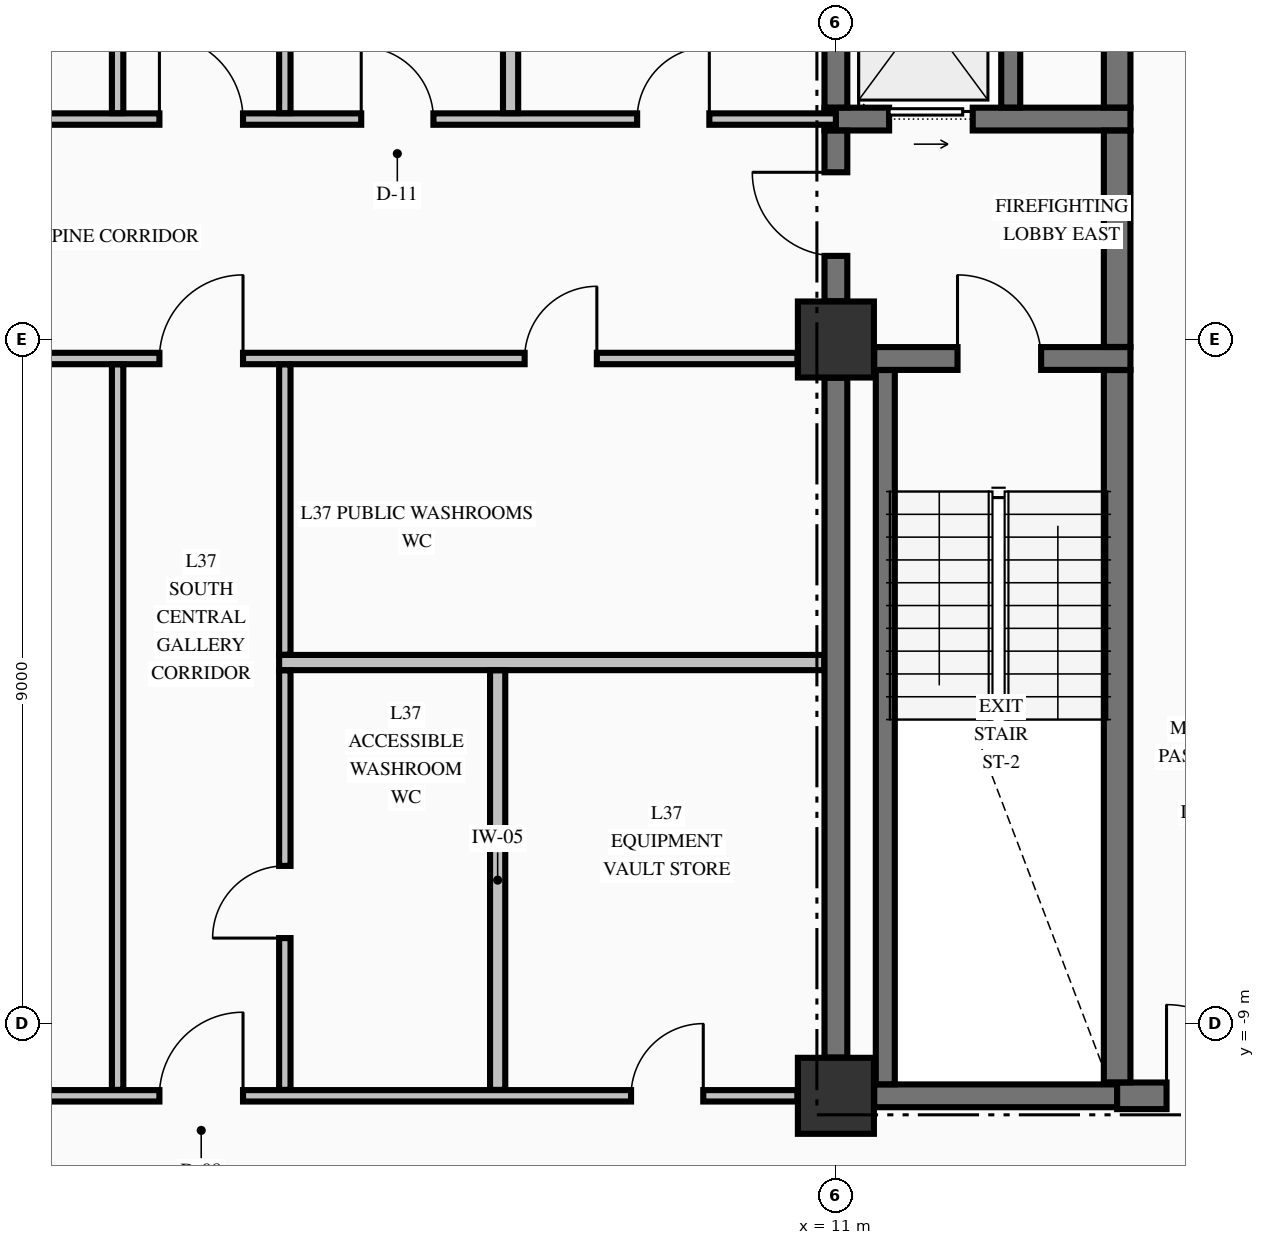
"""IFC4 building model, lengths in metres.
Left out: names, types, materials, properties, quantities, classifications, styles, units other than length and angle.
Written with IfcOpenShell. Run it as: python <this file> out.ifc"""

import sys

from ifc_helpers import new_model, si_unit, direction, frame, frame_2d, origin, origin_2d, place, context, subcontext, project, spatial, rectangle, extrude, element, fill, save


model = new_model("IFC4")
c1 = context("Model", 3, precision=1e-05, world=origin(), true_north=direction((0.0, 1.0)))
c2 = subcontext(c1, "Body", "Model", "MODEL_VIEW")
j1 = project(units=[si_unit("LENGTHUNIT", "METRE"), si_unit("PLANEANGLEUNIT", "RADIAN")], contexts=[c1])
p1 = place(None, origin())
s1 = spatial("IfcSite", under=j1, at=p1, CompositionType="ELEMENT")
p2 = place(p1, origin())
s2 = spatial("IfcBuilding", under=s1, at=p2, CompositionType="ELEMENT")
p3 = place(p2, frame((0.0, 0.0, 146.34)))
s3 = spatial("IfcBuildingStorey", under=s2, at=p3, CompositionType="ELEMENT", Elevation=146.34)
for number, where, z_axis, x_axis in (
    (1, (11.0, -9.95, -0.25), (0.0, 0.0, 1.0), (1.0, 0.0, 0.0)),
    (2, (11.0, 0.0, -0.25), (0.0, 0.0, 1.0), (1.0, 0.0, 0.0)),
):
    element("IfcColumn", number, at=place(p3, frame(where, z_axis=z_axis, x_axis=x_axis)), inside=s3, PredefinedType="COLUMN", context=c2, shape_type="SweptSolid", body=[
        extrude(rectangle(XDim=1.0, YDim=1.0, at=origin_2d()), origin(), (0.0, 0.0, 1.0), 3.57),
    ])
p4 = place(p3, frame((11.504, -9.95, 0.0), z_axis=(0.0, 0.0, 1.0), x_axis=(1.0, 0.0, 0.0)))
e3 = element("IfcWall", 3, at=p4, inside=s3, PredefinedType="SHEAR", context=c2, shape_type="SweptSolid", body=[
    extrude(rectangle(XDim=3.196, YDim=0.3, at=frame_2d((1.598, 0.0))), origin(), (0.0, 0.0, 1.0), 3.32),
])
p5 = place(p3, frame((14.7, -9.95, 0.0), z_axis=(0.0, 0.0, 1.0), x_axis=(1.0, 0.0, 0.0)))
e4 = element("IfcWall", 4, at=p5, inside=s3, PredefinedType="SHEAR", context=c2, shape_type="SweptSolid", body=[
    extrude(rectangle(XDim=4.796, YDim=0.35, at=frame_2d((2.398, 0.0))), origin(), (0.0, 0.0, 1.0), 3.32),
])
p6 = place(p5, frame((0.65, 0.0, 0.0)))
e5 = element("IfcOpeningElement", 5, at=p6, cuts=e4, PredefinedType="OPENING", context=c2, shape_type="SweptSolid", body=[
    extrude(rectangle(XDim=1.2, YDim=2.15, at=frame_2d((0.6, 1.075))), frame((0.0, 0.185, 0.0), z_axis=(0.0, -1.0, 0.0), x_axis=(1.0, 0.0, 0.0)), (0.0, 0.0, 1.0), 0.37),
])
p7 = place(p3, frame((11.504, -0.25, 0.0), z_axis=(0.0, 0.0, 1.0), x_axis=(1.0, 0.0, 0.0)))
e6 = element("IfcWall", 6, at=p7, inside=s3, PredefinedType="SHEAR", context=c2, shape_type="SweptSolid", body=[
    extrude(rectangle(XDim=3.371, YDim=0.3, at=frame_2d((1.686, 0.0))), origin(), (0.0, 0.0, 1.0), 3.32),
])
p8 = place(p7, frame((1.096, 0.0, 0.0)))
e7 = element("IfcOpeningElement", 7, at=p8, cuts=e6, PredefinedType="OPENING", context=c2, shape_type="SweptSolid", body=[
    extrude(rectangle(XDim=1.1, YDim=2.15, at=frame_2d((0.55, 1.075))), frame((0.0, 0.16, 0.0), z_axis=(0.0, -1.0, 0.0), x_axis=(1.0, 0.0, 0.0)), (0.0, 0.0, 1.0), 0.32),
])
p9 = place(p3, frame((10.85, 2.9, 0.0), z_axis=(0.0, 0.0, 1.0), x_axis=(1.0, 0.0, 0.0)))
e8 = element("IfcWall", 8, at=p9, inside=s3, PredefinedType="SHEAR", context=c2, shape_type="SweptSolid", body=[
    extrude(rectangle(XDim=4.025, YDim=0.3, at=frame_2d((2.012, 0.0))), origin(), (0.0, 0.0, 1.0), 3.32),
])
p10 = place(p9, frame((0.85, 0.0, 0.0)))
e9 = element("IfcOpeningElement", 9, at=p10, cuts=e8, PredefinedType="OPENING", context=c2, shape_type="SweptSolid", body=[
    extrude(rectangle(XDim=1.1, YDim=2.2, at=frame_2d((0.55, 1.1))), frame((0.0, 0.16, 0.0), z_axis=(0.0, -1.0, 0.0), x_axis=(1.0, 0.0, 0.0)), (0.0, 0.0, 1.0), 0.32),
])
p11 = place(p3, frame((-10.494, -9.95, 0.0), z_axis=(0.0, 0.0, 1.0), x_axis=(1.0, 0.0, 0.0)))
e10 = element("IfcWall", 10, at=p11, inside=s3, PredefinedType="PARTITIONING", context=c2, shape_type="SweptSolid", body=[
    extrude(rectangle(XDim=20.988, YDim=0.15, at=frame_2d((10.494, 0.0))), origin(), (0.0, 0.0, 1.0), 3.32),
])
p12 = place(p11, frame((12.594, 0.0, 0.0)))
e11 = element("IfcOpeningElement", 11, at=p12, cuts=e10, PredefinedType="OPENING", context=c2, shape_type="SweptSolid", body=[
    extrude(rectangle(XDim=1.1, YDim=2.15, at=frame_2d((0.55, 1.075))), frame((0.0, 0.085, 0.0), z_axis=(0.0, -1.0, 0.0), x_axis=(1.0, 0.0, 0.0)), (0.0, 0.0, 1.0), 0.17),
])
p13 = place(p11, frame((18.799, 0.0, 0.0)))
e12 = element("IfcOpeningElement", 12, at=p13, cuts=e10, PredefinedType="OPENING", context=c2, shape_type="SweptSolid", body=[
    extrude(rectangle(XDim=0.95, YDim=2.15, at=frame_2d((0.475, 1.075))), frame((0.0, 0.085, 0.0), z_axis=(0.0, -1.0, 0.0), x_axis=(1.0, 0.0, 0.0)), (0.0, 0.0, 1.0), 0.17),
])
p14 = place(p3, frame((3.675, -4.25, 0.0), z_axis=(0.0, 0.0, 1.0), x_axis=(1.0, 0.0, 0.0)))
e13 = element("IfcWall", 13, at=p14, inside=s3, PredefinedType="PARTITIONING", context=c2, shape_type="SweptSolid", body=[
    extrude(rectangle(XDim=7.172, YDim=0.2, at=frame_2d((3.586, 0.0))), origin(), (0.0, 0.0, 1.0), 3.32),
])
p15 = place(p3, frame((-10.494, -0.25, 0.0), z_axis=(0.0, 0.0, 1.0), x_axis=(1.0, 0.0, 0.0)))
e14 = element("IfcWall", 14, at=p15, inside=s3, PredefinedType="PARTITIONING", context=c2, shape_type="SweptSolid", body=[
    extrude(rectangle(XDim=20.988, YDim=0.15, at=frame_2d((10.494, 0.0))), origin(), (0.0, 0.0, 1.0), 3.32),
])
p16 = place(p15, frame((12.594, 0.0, 0.0)))
e15 = element("IfcOpeningElement", 15, at=p16, cuts=e14, PredefinedType="OPENING", context=c2, shape_type="SweptSolid", body=[
    extrude(rectangle(XDim=1.1, YDim=2.15, at=frame_2d((0.55, 1.075))), frame((0.0, 0.085, 0.0), z_axis=(0.0, -1.0, 0.0), x_axis=(1.0, 0.0, 0.0)), (0.0, 0.0, 1.0), 0.17),
])
p17 = place(p15, frame((5.249, 0.0, 0.0)))
e16 = element("IfcOpeningElement", 16, at=p17, cuts=e14, PredefinedType="OPENING", context=c2, shape_type="SweptSolid", body=[
    extrude(rectangle(XDim=1.05, YDim=2.15, at=frame_2d((0.525, 1.075))), frame((0.0, 0.085, 0.0), z_axis=(0.0, -1.0, 0.0), x_axis=(1.0, 0.0, 0.0)), (0.0, 0.0, 1.0), 0.17),
])
p18 = place(p15, frame((17.399, 0.0, 0.0)))
e17 = element("IfcOpeningElement", 17, at=p18, cuts=e14, PredefinedType="OPENING", context=c2, shape_type="SweptSolid", body=[
    extrude(rectangle(XDim=0.95, YDim=2.15, at=frame_2d((0.475, 1.075))), frame((0.0, 0.085, 0.0), z_axis=(0.0, -1.0, 0.0), x_axis=(1.0, 0.0, 0.0)), (0.0, 0.0, 1.0), 0.17),
])
p19 = place(p3, frame((-11.0, 2.9, 0.0), z_axis=(0.0, 0.0, 1.0), x_axis=(1.0, 0.0, 0.0)))
e18 = element("IfcWall", 18, at=p19, inside=s3, PredefinedType="PARTITIONING", context=c2, shape_type="SweptSolid", body=[
    extrude(rectangle(XDim=22.0, YDim=0.15, at=frame_2d((11.0, 0.0))), origin(), (0.0, 0.0, 1.0), 3.32),
])
p20 = place(p19, frame((13.1, 0.0, 0.0)))
e19 = element("IfcOpeningElement", 19, at=p20, cuts=e18, PredefinedType="OPENING", context=c2, shape_type="SweptSolid", body=[
    extrude(rectangle(XDim=1.1, YDim=2.15, at=frame_2d((0.55, 1.075))), frame((0.0, 0.085, 0.0), z_axis=(0.0, -1.0, 0.0), x_axis=(1.0, 0.0, 0.0)), (0.0, 0.0, 1.0), 0.17),
])
p21 = place(p19, frame((5.755, 0.0, 0.0)))
e20 = element("IfcOpeningElement", 20, at=p21, cuts=e18, PredefinedType="OPENING", context=c2, shape_type="SweptSolid", body=[
    extrude(rectangle(XDim=1.05, YDim=2.15, at=frame_2d((0.525, 1.075))), frame((0.0, 0.085, 0.0), z_axis=(0.0, -1.0, 0.0), x_axis=(1.0, 0.0, 0.0)), (0.0, 0.0, 1.0), 0.17),
])
p22 = place(p19, frame((15.755, 0.0, 0.0)))
e21 = element("IfcOpeningElement", 21, at=p22, cuts=e18, PredefinedType="OPENING", context=c2, shape_type="SweptSolid", body=[
    extrude(rectangle(XDim=0.95, YDim=2.15, at=frame_2d((0.475, 1.075))), frame((0.0, 0.085, 0.0), z_axis=(0.0, -1.0, 0.0), x_axis=(1.0, 0.0, 0.0)), (0.0, 0.0, 1.0), 0.17),
])
p23 = place(p19, frame((19.385, 0.0, 0.0)))
e22 = element("IfcOpeningElement", 22, at=p23, cuts=e18, PredefinedType="OPENING", context=c2, shape_type="SweptSolid", body=[
    extrude(rectangle(XDim=0.95, YDim=2.15, at=frame_2d((0.475, 1.075))), frame((0.0, 0.085, 0.0), z_axis=(0.0, -1.0, 0.0), x_axis=(1.0, 0.0, 0.0)), (0.0, 0.0, 1.0), 0.17),
])
p24 = place(p3, frame((11.0, -9.446, 0.0), z_axis=(0.0, 0.0, 1.0), x_axis=(0.0, 1.0, 0.0)))
e23 = element("IfcWall", 23, at=p24, inside=s3, PredefinedType="SHEAR", context=c2, shape_type="SweptSolid", body=[
    extrude(rectangle(XDim=8.942, YDim=0.3, at=frame_2d((4.471, 0.0))), origin(), (0.0, 0.0, 1.0), 3.32),
])
p25 = place(p3, frame((11.0, 0.504, 0.0), z_axis=(0.0, 0.0, 1.0), x_axis=(0.0, 1.0, 0.0)))
e24 = element("IfcWall", 24, at=p25, inside=s3, PredefinedType="SHEAR", context=c2, shape_type="SweptSolid", body=[
    extrude(rectangle(XDim=2.244, YDim=0.3, at=frame_2d((1.122, 0.0))), origin(), (0.0, 0.0, 1.0), 3.32),
])
p26 = place(p25, frame((0.596, 0.0, 0.0)))
e25 = element("IfcOpeningElement", 25, at=p26, cuts=e24, PredefinedType="OPENING", context=c2, shape_type="SweptSolid", body=[
    extrude(rectangle(XDim=1.1, YDim=2.15, at=frame_2d((0.55, 1.075))), frame((0.0, 0.16, 0.0), z_axis=(0.0, -1.0, 0.0), x_axis=(1.0, 0.0, 0.0)), (0.0, 0.0, 1.0), 0.32),
])
p27 = place(p3, frame((11.0, 3.052, 0.0), z_axis=(0.0, 0.0, 1.0), x_axis=(0.0, 1.0, 0.0)))
e26 = element("IfcWall", 26, at=p27, inside=s3, PredefinedType="SHEAR", context=c2, shape_type="SweptSolid", body=[
    extrude(rectangle(XDim=2.496, YDim=0.3, at=frame_2d((1.248, 0.0))), origin(), (0.0, 0.0, 1.0), 3.32),
])
p28 = place(p3, frame((11.65, -9.798, 0.0), z_axis=(0.0, 0.0, 1.0), x_axis=(0.0, 1.0, 0.0)))
e27 = element("IfcWall", 27, at=p28, inside=s3, PredefinedType="SOLIDWALL", context=c2, shape_type="SweptSolid", body=[
    extrude(rectangle(XDim=9.396, YDim=0.25, at=frame_2d((4.698, 0.0))), origin(), (0.0, 0.0, 1.0), 3.32),
])
p29 = place(p3, frame((13.3, 3.052, 0.0), z_axis=(0.0, 0.0, 1.0), x_axis=(0.0, 1.0, 0.0)))
e28 = element("IfcWall", 28, at=p29, inside=s3, PredefinedType="SOLIDWALL", context=c2, shape_type="SweptSolid", body=[
    extrude(rectangle(XDim=2.496, YDim=0.25, at=frame_2d((1.248, 0.0))), origin(), (0.0, 0.0, 1.0), 3.32),
])
p30 = place(p3, frame((14.7, -9.773, 0.0), z_axis=(0.0, 0.0, 1.0), x_axis=(0.0, 1.0, 0.0)))
e29 = element("IfcWall", 29, at=p30, inside=s3, PredefinedType="SHEAR", context=c2, shape_type="SweptSolid", body=[
    extrude(rectangle(XDim=9.371, YDim=0.35, at=frame_2d((4.686, 0.0))), origin(), (0.0, 0.0, 1.0), 3.32),
])
p31 = place(p3, frame((14.7, -0.098, 0.0), z_axis=(0.0, 0.0, 1.0), x_axis=(0.0, 1.0, 0.0)))
e30 = element("IfcWall", 30, at=p31, inside=s3, PredefinedType="SHEAR", context=c2, shape_type="SweptSolid", body=[
    extrude(rectangle(XDim=2.846, YDim=0.35, at=frame_2d((1.423, 0.0))), origin(), (0.0, 0.0, 1.0), 3.32),
])
p32 = place(p3, frame((14.7, 3.052, 0.0), z_axis=(0.0, 0.0, 1.0), x_axis=(0.0, 1.0, 0.0)))
e31 = element("IfcWall", 31, at=p32, inside=s3, PredefinedType="SHEAR", context=c2, shape_type="SweptSolid", body=[
    extrude(rectangle(XDim=2.496, YDim=0.35, at=frame_2d((1.248, 0.0))), origin(), (0.0, 0.0, 1.0), 3.32),
])
p33 = place(p3, frame((1.55, -9.872, 0.0), z_axis=(0.0, 0.0, 1.0), x_axis=(0.0, 1.0, 0.0)))
e32 = element("IfcWall", 32, at=p33, inside=s3, PredefinedType="PARTITIONING", context=c2, shape_type="SweptSolid", body=[
    extrude(rectangle(XDim=9.544, YDim=0.15, at=frame_2d((4.772, 0.0))), origin(), (0.0, 0.0, 1.0), 3.32),
])
p34 = place(p3, frame((1.55, 2.978, 0.0), z_axis=(0.0, 0.0, 1.0), x_axis=(0.0, 1.0, 0.0)))
e33 = element("IfcWall", 33, at=p34, inside=s3, PredefinedType="PARTITIONING", context=c2, shape_type="SweptSolid", body=[
    extrude(rectangle(XDim=7.444, YDim=0.15, at=frame_2d((3.722, 0.0))), origin(), (0.0, 0.0, 1.0), 3.32),
])
p35 = place(p3, frame((3.75, -9.872, 0.0), z_axis=(0.0, 0.0, 1.0), x_axis=(0.0, 1.0, 0.0)))
e34 = element("IfcWall", 34, at=p35, inside=s3, PredefinedType="PARTITIONING", context=c2, shape_type="SweptSolid", body=[
    extrude(rectangle(XDim=5.519, YDim=0.15, at=frame_2d((2.76, 0.0))), origin(), (0.0, 0.0, 1.0), 3.32),
])
p36 = place(p35, frame((1.997, 0.0, 0.0)))
e35 = element("IfcOpeningElement", 35, at=p36, cuts=e34, PredefinedType="OPENING", context=c2, shape_type="SweptSolid", body=[
    extrude(rectangle(XDim=0.95, YDim=2.15, at=frame_2d((0.475, 1.075))), frame((0.0, 0.085, 0.0), z_axis=(0.0, -1.0, 0.0), x_axis=(1.0, 0.0, 0.0)), (0.0, 0.0, 1.0), 0.17),
])
p37 = place(p3, frame((3.75, -4.147, 0.0), z_axis=(0.0, 0.0, 1.0), x_axis=(0.0, 1.0, 0.0)))
e36 = element("IfcWall", 36, at=p37, inside=s3, PredefinedType="PARTITIONING", context=c2, shape_type="SweptSolid", body=[
    extrude(rectangle(XDim=3.819, YDim=0.15, at=frame_2d((1.91, 0.0))), origin(), (0.0, 0.0, 1.0), 3.32),
])
p38 = place(p3, frame((3.75, 2.978, 0.0), z_axis=(0.0, 0.0, 1.0), x_axis=(0.0, 1.0, 0.0)))
e37 = element("IfcWall", 37, at=p38, inside=s3, PredefinedType="PARTITIONING", context=c2, shape_type="SweptSolid", body=[
    extrude(rectangle(XDim=7.444, YDim=0.15, at=frame_2d((3.722, 0.0))), origin(), (0.0, 0.0, 1.0), 3.32),
])
p39 = place(p3, frame((6.55, -9.872, 0.0), z_axis=(0.0, 0.0, 1.0), x_axis=(0.0, 1.0, 0.0)))
e38 = element("IfcWall", 38, at=p39, inside=s3, PredefinedType="PARTITIONING", context=c2, shape_type="SweptSolid", body=[
    extrude(rectangle(XDim=5.519, YDim=0.2, at=frame_2d((2.76, 0.0))), origin(), (0.0, 0.0, 1.0), 3.32),
])
p40 = place(p3, frame((6.72, 2.978, 0.0), z_axis=(0.0, 0.0, 1.0), x_axis=(0.0, 1.0, 0.0)))
e39 = element("IfcWall", 39, at=p40, inside=s3, PredefinedType="PARTITIONING", context=c2, shape_type="SweptSolid", body=[
    extrude(rectangle(XDim=7.444, YDim=0.2, at=frame_2d((3.722, 0.0))), origin(), (0.0, 0.0, 1.0), 3.32),
])
p41 = place(p8, origin())
e40 = element("IfcDoor", 40, at=p41, inside=s3, OperationType="SINGLE_SWING_LEFT", PredefinedType="DOOR", context=c2, shape_type="SweptSolid", body=[
    extrude(rectangle(XDim=1.1, YDim=2.15, at=frame_2d((0.55, 1.075))), frame((0.0, 0.025, 0.0), z_axis=(0.0, -1.0, 0.0), x_axis=(1.0, 0.0, 0.0)), (0.0, 0.0, 1.0), 0.05),
])
fill(e7, e40)
p42 = place(p26, origin())
e41 = element("IfcDoor", 41, at=p42, inside=s3, OperationType="SINGLE_SWING_RIGHT", PredefinedType="DOOR", context=c2, shape_type="SweptSolid", body=[
    extrude(rectangle(XDim=1.1, YDim=2.15, at=frame_2d((0.55, 1.075))), frame((0.0, 0.025, 0.0), z_axis=(0.0, -1.0, 0.0), x_axis=(1.0, 0.0, 0.0)), (0.0, 0.0, 1.0), 0.05),
])
fill(e25, e41)
p43 = place(p10, origin())
e42 = element("IfcDoor", 42, at=p43, inside=s3, OperationType="SLIDING_TO_RIGHT", PredefinedType="DOOR", context=c2, shape_type="SweptSolid", body=[
    extrude(rectangle(XDim=1.1, YDim=2.2, at=frame_2d((0.55, 1.1))), frame((0.0, 0.025, 0.0), z_axis=(0.0, -1.0, 0.0), x_axis=(1.0, 0.0, 0.0)), (0.0, 0.0, 1.0), 0.05),
])
fill(e9, e42)
p44 = place(p6, origin())
e43 = element("IfcDoor", 43, at=p44, inside=s3, OperationType="SINGLE_SWING_LEFT", PredefinedType="DOOR", context=c2, shape_type="SweptSolid", body=[
    extrude(rectangle(XDim=1.2, YDim=2.15, at=frame_2d((0.6, 1.075))), frame((0.0, 0.025, 0.0), z_axis=(0.0, -1.0, 0.0), x_axis=(1.0, 0.0, 0.0)), (0.0, 0.0, 1.0), 0.05),
])
fill(e5, e43)
p45 = place(p12, origin())
e44 = element("IfcDoor", 44, at=p45, inside=s3, OperationType="SINGLE_SWING_RIGHT", PredefinedType="DOOR", context=c2, shape_type="SweptSolid", body=[
    extrude(rectangle(XDim=1.1, YDim=2.15, at=frame_2d((0.55, 1.075))), frame((0.0, 0.025, 0.0), z_axis=(0.0, -1.0, 0.0), x_axis=(1.0, 0.0, 0.0)), (0.0, 0.0, 1.0), 0.05),
])
fill(e11, e44)
p46 = place(p20, origin())
e45 = element("IfcDoor", 45, at=p46, inside=s3, OperationType="SINGLE_SWING_LEFT", PredefinedType="DOOR", context=c2, shape_type="SweptSolid", body=[
    extrude(rectangle(XDim=1.1, YDim=2.15, at=frame_2d((0.55, 1.075))), frame((0.0, 0.025, 0.0), z_axis=(0.0, -1.0, 0.0), x_axis=(1.0, 0.0, 0.0)), (0.0, 0.0, 1.0), 0.05),
])
fill(e19, e45)
p47 = place(p16, origin())
e46 = element("IfcDoor", 46, at=p47, inside=s3, OperationType="SINGLE_SWING_RIGHT", PredefinedType="DOOR", context=c2, shape_type="SweptSolid", body=[
    extrude(rectangle(XDim=1.1, YDim=2.15, at=frame_2d((0.55, 1.075))), frame((0.0, 0.025, 0.0), z_axis=(0.0, -1.0, 0.0), x_axis=(1.0, 0.0, 0.0)), (0.0, 0.0, 1.0), 0.05),
])
fill(e15, e46)
p48 = place(p22, origin())
e47 = element("IfcDoor", 47, at=p48, inside=s3, OperationType="SINGLE_SWING_LEFT", PredefinedType="DOOR", context=c2, shape_type="SweptSolid", body=[
    extrude(rectangle(XDim=0.95, YDim=2.15, at=frame_2d((0.475, 1.075))), frame((0.0, 0.025, 0.0), z_axis=(0.0, -1.0, 0.0), x_axis=(1.0, 0.0, 0.0)), (0.0, 0.0, 1.0), 0.05),
])
fill(e21, e47)
p49 = place(p23, origin())
e48 = element("IfcDoor", 48, at=p49, inside=s3, OperationType="SINGLE_SWING_RIGHT", PredefinedType="DOOR", context=c2, shape_type="SweptSolid", body=[
    extrude(rectangle(XDim=0.95, YDim=2.15, at=frame_2d((0.475, 1.075))), frame((0.0, 0.025, 0.0), z_axis=(0.0, -1.0, 0.0), x_axis=(1.0, 0.0, 0.0)), (0.0, 0.0, 1.0), 0.05),
])
fill(e22, e48)
p50 = place(p18, origin())
e49 = element("IfcDoor", 49, at=p50, inside=s3, OperationType="SINGLE_SWING_RIGHT", PredefinedType="DOOR", context=c2, shape_type="SweptSolid", body=[
    extrude(rectangle(XDim=0.95, YDim=2.15, at=frame_2d((0.475, 1.075))), frame((0.0, 0.025, 0.0), z_axis=(0.0, -1.0, 0.0), x_axis=(1.0, 0.0, 0.0)), (0.0, 0.0, 1.0), 0.05),
])
fill(e17, e49)
p51 = place(p36, origin())
e50 = element("IfcDoor", 50, at=p51, inside=s3, OperationType="SINGLE_SWING_LEFT", PredefinedType="DOOR", context=c2, shape_type="SweptSolid", body=[
    extrude(rectangle(XDim=0.95, YDim=2.15, at=frame_2d((0.475, 1.075))), frame((0.0, 0.025, 0.0), z_axis=(0.0, -1.0, 0.0), x_axis=(1.0, 0.0, 0.0)), (0.0, 0.0, 1.0), 0.05),
])
fill(e35, e50)
p52 = place(p13, origin())
e51 = element("IfcDoor", 51, at=p52, inside=s3, OperationType="SINGLE_SWING_RIGHT", PredefinedType="DOOR", context=c2, shape_type="SweptSolid", body=[
    extrude(rectangle(XDim=0.95, YDim=2.15, at=frame_2d((0.475, 1.075))), frame((0.0, 0.025, 0.0), z_axis=(0.0, -1.0, 0.0), x_axis=(1.0, 0.0, 0.0)), (0.0, 0.0, 1.0), 0.05),
])
fill(e12, e51)
save(model, sys.argv[1])
